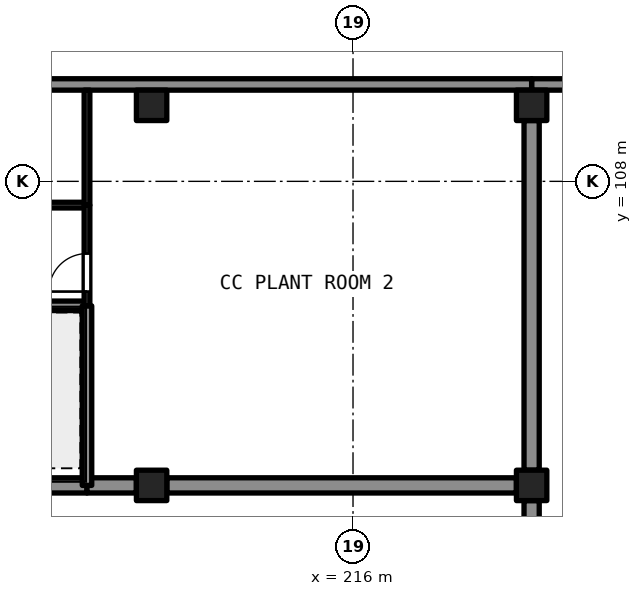
"""IFC4 building model, lengths in metres.
Left out: names, types, materials, properties, quantities, classifications, styles, units other than length and angle.
Written with IfcOpenShell. Run it as: python <this file> out.ifc"""

import sys

from ifc_helpers import new_model, si_unit, direction, frame, frame_2d, origin, origin_2d, place, context, subcontext, project, spatial, rectangle, extrude, element, fill, save


model = new_model("IFC4")
c1 = context("Model", 3, precision=1e-05, world=origin(), true_north=direction((0.0, 1.0)))
c2 = subcontext(c1, "Body", "Model", "MODEL_VIEW")
j1 = project(units=[si_unit("LENGTHUNIT", "METRE"), si_unit("PLANEANGLEUNIT", "RADIAN")], contexts=[c1])
p1 = place(None, origin())
s1 = spatial("IfcSite", under=j1, at=p1, CompositionType="ELEMENT")
p2 = place(p1, origin())
s2 = spatial("IfcBuilding", under=s1, at=p2, CompositionType="ELEMENT")
p3 = place(p2, frame((0.0, 0.0, 15.0)))
s3 = spatial("IfcBuildingStorey", under=s2, at=p3, CompositionType="ELEMENT", Elevation=15.0)
for number, where, z_axis, x_axis in (
    (1, (210.7, 100.0, 0.0), (0.0, 0.0, 1.0), (1.0, 0.0, 0.0)),
    (2, (210.7, 110.0, 0.0), (0.0, 0.0, 1.0), (1.0, 0.0, 0.0)),
    (3, (220.7, 100.0, 0.0), (0.0, 0.0, 1.0), (1.0, 0.0, 0.0)),
    (4, (220.7, 110.0, 0.0), (0.0, 0.0, 1.0), (1.0, 0.0, 0.0)),
):
    element("IfcColumn", number, at=place(p3, frame(where, z_axis=z_axis, x_axis=x_axis)), inside=s3, PredefinedType="COLUMN", context=c2, shape_type="SweptSolid", body=[
        extrude(rectangle(XDim=0.8, YDim=0.8, at=origin_2d()), origin(), (0.0, 0.0, 1.0), 5.4),
    ])
p4 = place(p3, frame((201.1, 100.0, 0.0), z_axis=(0.0, 0.0, 1.0), x_axis=(1.0, 0.0, 0.0)))
e5 = element("IfcWall", 5, at=p4, inside=s3, PredefinedType="SHEAR", context=c2, shape_type="SweptSolid", body=[
    extrude(rectangle(XDim=7.9, YDim=0.4, at=frame_2d((3.95, 0.0))), origin(), (0.0, 0.0, 1.0), 5.4),
])
p5 = place(p3, frame((209.0, 100.0, 0.0), z_axis=(0.0, 0.0, 1.0), x_axis=(1.0, 0.0, 0.0)))
e6 = element("IfcWall", 6, at=p5, inside=s3, PredefinedType="SHEAR", context=c2, shape_type="SweptSolid", body=[
    extrude(rectangle(XDim=1.3, YDim=0.4, at=frame_2d((0.65, 0.0))), origin(), (0.0, 0.0, 1.0), 5.4),
])
p6 = place(p3, frame((211.1, 100.0, 0.0), z_axis=(0.0, 0.0, 1.0), x_axis=(1.0, 0.0, 0.0)))
e7 = element("IfcWall", 7, at=p6, inside=s3, PredefinedType="SHEAR", context=c2, shape_type="SweptSolid", body=[
    extrude(rectangle(XDim=9.2, YDim=0.4, at=frame_2d((4.6, 0.0))), origin(), (0.0, 0.0, 1.0), 5.4),
])
for number, where, z_axis, x_axis in (
    (8, (220.7, 90.4, 0.0), (0.0, 0.0, 1.0), (0.0, 1.0, 0.0)),
    (9, (220.7, 100.4, 0.0), (0.0, 0.0, 1.0), (0.0, 1.0, 0.0)),
):
    element("IfcWall", number, at=place(p3, frame(where, z_axis=z_axis, x_axis=x_axis)), inside=s3, PredefinedType="SHEAR", context=c2, shape_type="SweptSolid", body=[
        extrude(rectangle(XDim=9.2, YDim=0.4, at=frame_2d((4.6, 0.0))), origin(), (0.0, 0.0, 1.0), 5.4),
    ])
p7 = place(p3, frame((220.7, 110.55, 0.0), z_axis=(0.0, 0.0, 1.0), x_axis=(1.0, 0.0, 0.0)))
e10 = element("IfcWall", 10, at=p7, inside=s3, PredefinedType="SOLIDWALL", context=c2, shape_type="SweptSolid", body=[
    extrude(rectangle(XDim=30.55, YDim=0.3, at=frame_2d((15.275, 0.0))), origin(), (0.0, 0.0, 1.0), 5.4),
])
p8 = place(p3, frame((170.7, 110.55, 0.0), z_axis=(0.0, 0.0, 1.0), x_axis=(1.0, 0.0, 0.0)))
e11 = element("IfcWall", 11, at=p8, inside=s3, PredefinedType="SOLIDWALL", context=c2, shape_type="SweptSolid", body=[
    extrude(rectangle(XDim=50.0, YDim=0.3, at=frame_2d((25.0, 0.0))), origin(), (0.0, 0.0, 1.0), 4.99),
])
p9 = place(p8, frame((3.7, 0.0, 0.9)))
e12 = element("IfcOpeningElement", 12, at=p9, cuts=e11, PredefinedType="OPENING", context=c2, shape_type="SweptSolid", body=[
    extrude(rectangle(XDim=2.4, YDim=1.8, at=frame_2d((1.2, 0.9))), frame((0.0, 0.161, 0.0), z_axis=(0.0, -1.0, 0.0), x_axis=(1.0, 0.0, 0.0)), (0.0, 0.0, 1.0), 0.321),
])
p10 = place(p8, frame((13.7, 0.0, 0.9)))
e13 = element("IfcOpeningElement", 13, at=p10, cuts=e11, PredefinedType="OPENING", context=c2, shape_type="SweptSolid", body=[
    extrude(rectangle(XDim=2.4, YDim=1.8, at=frame_2d((1.2, 0.9))), frame((0.0, 0.161, 0.0), z_axis=(0.0, -1.0, 0.0), x_axis=(1.0, 0.0, 0.0)), (0.0, 0.0, 1.0), 0.321),
])
p11 = place(p3, frame((199.85, 104.725, 0.0), z_axis=(0.0, 0.0, 1.0), x_axis=(1.0, 0.0, 0.0)))
e14 = element("IfcWall", 14, at=p11, inside=s3, PredefinedType="SHEAR", context=c2, shape_type="SweptSolid", body=[
    extrude(rectangle(XDim=9.15, YDim=0.25, at=frame_2d((4.575, 0.0))), origin(), (0.0, 0.0, 1.0), 4.99),
])
p12 = place(p11, frame((0.425, 0.0, 0.0)))
e15 = element("IfcOpeningElement", 15, at=p12, cuts=e14, PredefinedType="OPENING", context=c2, shape_type="SweptSolid", body=[
    extrude(rectangle(XDim=2.4, YDim=2.1, at=frame_2d((1.2, 1.05))), frame((0.0, 0.135, 0.0), z_axis=(0.0, -1.0, 0.0), x_axis=(1.0, 0.0, 0.0)), (0.0, 0.0, 1.0), 0.271),
])
p13 = place(p3, frame((209.0, 100.0, 0.0), z_axis=(0.0, 0.0, 1.0), x_axis=(0.0, 1.0, 0.0)))
e16 = element("IfcWall", 16, at=p13, inside=s3, PredefinedType="SHEAR", context=c2, shape_type="SweptSolid", body=[
    extrude(rectangle(XDim=4.725, YDim=0.25, at=frame_2d((2.363, 0.0))), origin(), (0.0, 0.0, 1.0), 4.99),
])
p14 = place(p3, frame((209.0, 107.375, 0.0), z_axis=(0.0, 0.0, 1.0), x_axis=(-1.0, 0.0, 0.0)))
e17 = element("IfcWall", 17, at=p14, inside=s3, PredefinedType="PARTITIONING", context=c2, shape_type="SweptSolid", body=[
    extrude(rectangle(XDim=38.3, YDim=0.15, at=frame_2d((19.15, 0.0))), origin(), (0.0, 0.0, 1.0), 4.99),
])
p15 = place(p14, frame((32.85, 0.0, 0.0)))
e18 = element("IfcOpeningElement", 18, at=p15, cuts=e17, PredefinedType="OPENING", context=c2, shape_type="SweptSolid", body=[
    extrude(rectangle(XDim=1.0, YDim=2.1, at=frame_2d((0.5, 1.05))), frame((0.0, 0.085, 0.0), z_axis=(0.0, -1.0, 0.0), x_axis=(1.0, 0.0, 0.0)), (0.0, 0.0, 1.0), 0.171),
])
p16 = place(p14, frame((22.85, 0.0, 0.0)))
e19 = element("IfcOpeningElement", 19, at=p16, cuts=e17, PredefinedType="OPENING", context=c2, shape_type="SweptSolid", body=[
    extrude(rectangle(XDim=1.0, YDim=2.1, at=frame_2d((0.5, 1.05))), frame((0.0, 0.085, 0.0), z_axis=(0.0, -1.0, 0.0), x_axis=(1.0, 0.0, 0.0)), (0.0, 0.0, 1.0), 0.171),
])
p17 = place(p14, frame((13.35, 0.0, 0.0)))
e20 = element("IfcOpeningElement", 20, at=p17, cuts=e17, PredefinedType="OPENING", context=c2, shape_type="SweptSolid", body=[
    extrude(rectangle(XDim=1.0, YDim=2.1, at=frame_2d((0.5, 1.05))), frame((0.0, 0.085, 0.0), z_axis=(0.0, -1.0, 0.0), x_axis=(1.0, 0.0, 0.0)), (0.0, 0.0, 1.0), 0.171),
])
p18 = place(p14, frame((3.95, 0.0, 0.0)))
e21 = element("IfcOpeningElement", 21, at=p18, cuts=e17, PredefinedType="OPENING", context=c2, shape_type="SweptSolid", body=[
    extrude(rectangle(XDim=1.0, YDim=2.1, at=frame_2d((0.5, 1.05))), frame((0.0, 0.085, 0.0), z_axis=(0.0, -1.0, 0.0), x_axis=(1.0, 0.0, 0.0)), (0.0, 0.0, 1.0), 0.171),
])
p19 = place(p3, frame((209.0, 104.725, 0.0), z_axis=(0.0, 0.0, 1.0), x_axis=(0.0, 1.0, 0.0)))
e22 = element("IfcWall", 22, at=p19, inside=s3, PredefinedType="PARTITIONING", context=c2, shape_type="SweptSolid", body=[
    extrude(rectangle(XDim=2.65, YDim=0.15, at=frame_2d((1.325, 0.0))), origin(), (0.0, 0.0, 1.0), 4.99),
])
p20 = place(p19, frame((0.375, 0.0, 0.0)))
e23 = element("IfcOpeningElement", 23, at=p20, cuts=e22, PredefinedType="OPENING", context=c2, shape_type="SweptSolid", body=[
    extrude(rectangle(XDim=1.0, YDim=2.1, at=frame_2d((0.5, 1.05))), frame((0.0, 0.085, 0.0), z_axis=(0.0, -1.0, 0.0), x_axis=(1.0, 0.0, 0.0)), (0.0, 0.0, 1.0), 0.171),
])
p21 = place(p3, frame((209.0, 107.375, 0.0), z_axis=(0.0, 0.0, 1.0), x_axis=(0.0, 1.0, 0.0)))
e24 = element("IfcWall", 24, at=p21, inside=s3, PredefinedType="PARTITIONING", context=c2, shape_type="SweptSolid", body=[
    extrude(rectangle(XDim=3.025, YDim=0.15, at=frame_2d((1.512, 0.0))), origin(), (0.0, 0.0, 1.0), 4.99),
])
p22 = place(p20, origin())
e25 = element("IfcDoor", 25, at=p22, inside=s3, OperationType="SINGLE_SWING_LEFT", PredefinedType="DOOR", context=c2, shape_type="SweptSolid", body=[
    extrude(rectangle(XDim=1.0, YDim=2.1, at=frame_2d((0.5, 1.05))), frame((0.0, 0.025, 0.0), z_axis=(0.0, -1.0, 0.0), x_axis=(1.0, 0.0, 0.0)), (0.0, 0.0, 1.0), 0.05),
])
fill(e23, e25)
save(model, sys.argv[1])
